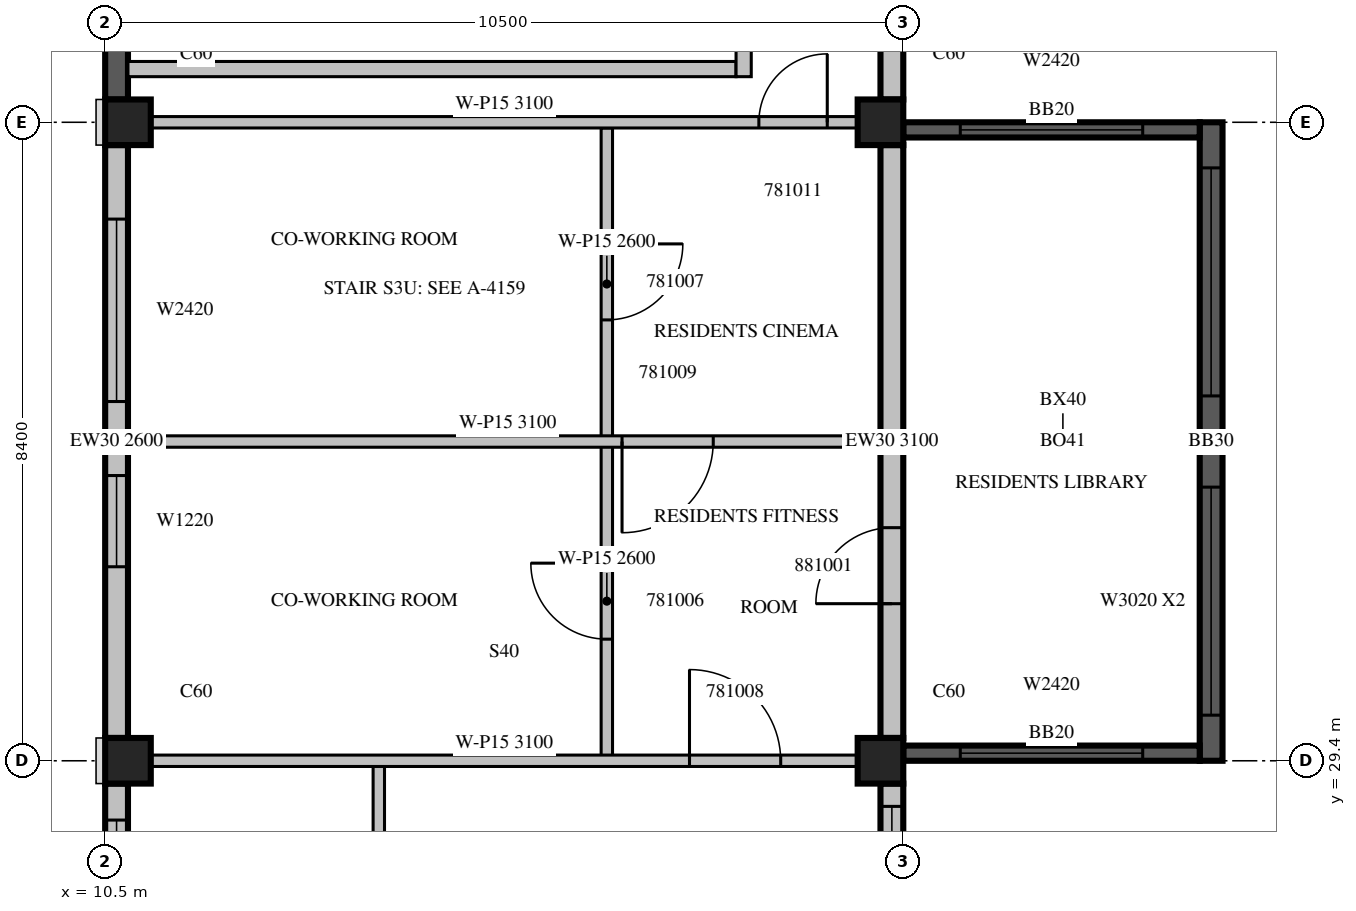
"""IFC4 building model, lengths in metres.
Left out: names, types, materials, properties, quantities, classifications, styles, units other than length and angle.
Written with IfcOpenShell. Run it as: python <this file> out.ifc"""

import sys

from ifc_helpers import new_model, si_unit, direction, frame, frame_2d, origin, origin_2d, place, context, subcontext, project, spatial, rectangle, extrude, source, transform, mapped, element, fill, save


model = new_model("IFC4")
c1 = context("Model", 3, precision=1e-05, world=origin(), true_north=direction((0.0, 1.0)))
c2 = subcontext(c1, "Body", "Model", "MODEL_VIEW")
j1 = project(units=[si_unit("LENGTHUNIT", "METRE"), si_unit("PLANEANGLEUNIT", "RADIAN")], contexts=[c1])
p1 = place(None, origin())
s1 = spatial("IfcSite", under=j1, at=p1, CompositionType="ELEMENT")
p2 = place(p1, origin())
s2 = spatial("IfcBuilding", under=s1, at=p2, CompositionType="ELEMENT")
p3 = place(p2, frame((0.0, 0.0, 344.0)))
s3 = spatial("IfcBuildingStorey", under=s2, at=p3, CompositionType="ELEMENT", Elevation=344.0)
m1 = source(origin(), c2, "Body", "SweptSolid", [
    extrude(rectangle(XDim=0.6, YDim=0.6, at=origin_2d()), origin(), (0.0, 0.0, 1.0), 3.5),
])
for number, where, z_axis, x_axis in (
    (1, (10.8, 29.4, 0.0), (0.0, 0.0, 1.0), (1.0, 0.0, 0.0)),
    (2, (20.7, 29.4, 0.0), (0.0, 0.0, 1.0), (1.0, 0.0, 0.0)),
    (3, (10.8, 37.8, 0.0), (0.0, 0.0, 1.0), (1.0, 0.0, 0.0)),
    (4, (20.7, 37.8, 0.0), (0.0, 0.0, 1.0), (1.0, 0.0, 0.0)),
):
    element("IfcColumn", number, at=place(p3, frame(where, z_axis=z_axis, x_axis=x_axis)), inside=s3, PredefinedType="COLUMN", context=c2, shape_type="MappedRepresentation", body=[
        mapped(m1, transform((0.0, 0.0, 0.0), scale=1.0)),
    ])
m2 = source(origin(), c2, "Body", "SweptSolid", [
    extrude(rectangle(XDim=8.4, YDim=0.3, at=frame_2d((4.2, 0.0))), origin(), (0.0, 0.0, 1.0), 3.1),
])
p4 = place(p3, frame((25.05, 29.4, 0.0), z_axis=(0.0, 0.0, 1.0), x_axis=(0.0, 1.0, 0.0)))
e5 = element("IfcWall", 5, at=p4, inside=s3, PredefinedType="SOLIDWALL", context=c2, shape_type="MappedRepresentation", body=[
    mapped(m2, transform((0.0, 0.0, 0.0), scale=1.0)),
])
m3 = source(origin(), c2, "Body", "SweptSolid", [
    extrude(rectangle(XDim=3.0, YDim=2.0, at=frame_2d((1.5, 1.0))), frame((0.0, 0.16, 0.0), z_axis=(0.0, -1.0, 0.0), x_axis=(1.0, 0.0, 0.0)), (0.0, 0.0, 1.0), 0.32),
])
p5 = place(p4, frame((0.6, 0.0, 0.6)))
e6 = element("IfcOpeningElement", 6, at=p5, cuts=e5, PredefinedType="OPENING", context=c2, shape_type="MappedRepresentation", body=[
    mapped(m3, transform((0.0, 0.0, 0.0), scale=1.0)),
])
p6 = place(p4, frame((4.8, 0.0, 0.6)))
e7 = element("IfcOpeningElement", 7, at=p6, cuts=e5, PredefinedType="OPENING", context=c2, shape_type="MappedRepresentation", body=[
    mapped(m3, transform((0.0, 0.0, 0.0), scale=1.0)),
])
m4 = source(origin(), c2, "Body", "SweptSolid", [
    extrude(rectangle(XDim=3.9, YDim=0.2, at=frame_2d((1.95, 0.0))), origin(), (0.0, 0.0, 1.0), 3.1),
])
p7 = place(p3, frame((21.0, 29.5, 0.0), z_axis=(0.0, 0.0, 1.0), x_axis=(1.0, 0.0, 0.0)))
e8 = element("IfcWall", 8, at=p7, inside=s3, PredefinedType="SOLIDWALL", context=c2, shape_type="MappedRepresentation", body=[
    mapped(m4, transform((0.0, 0.0, 0.0), scale=1.0)),
])
m5 = source(origin(), c2, "Body", "SweptSolid", [
    extrude(rectangle(XDim=2.4, YDim=2.0, at=frame_2d((1.2, 1.0))), frame((0.0, 0.11, 0.0), z_axis=(0.0, -1.0, 0.0), x_axis=(1.0, 0.0, 0.0)), (0.0, 0.0, 1.0), 0.22),
])
p8 = place(p7, frame((0.75, 0.0, 0.6)))
e9 = element("IfcOpeningElement", 9, at=p8, cuts=e8, PredefinedType="OPENING", context=c2, shape_type="MappedRepresentation", body=[
    mapped(m5, transform((0.0, 0.0, 0.0), scale=1.0)),
])
p9 = place(p3, frame((21.0, 37.7, 0.0), z_axis=(0.0, 0.0, 1.0), x_axis=(1.0, 0.0, 0.0)))
e10 = element("IfcWall", 10, at=p9, inside=s3, PredefinedType="SOLIDWALL", context=c2, shape_type="MappedRepresentation", body=[
    mapped(m4, transform((0.0, 0.0, 0.0), scale=1.0)),
])
p10 = place(p9, frame((0.75, 0.0, 0.6)))
e11 = element("IfcOpeningElement", 11, at=p10, cuts=e10, PredefinedType="OPENING", context=c2, shape_type="MappedRepresentation", body=[
    mapped(m5, transform((0.0, 0.0, 0.0), scale=1.0)),
])
m6 = source(origin(), c2, "Body", "SweptSolid", [
    extrude(rectangle(XDim=7.5, YDim=0.3, at=frame_2d((3.75, 0.0))), origin(), (0.0, 0.0, 1.0), 3.1),
])
p11 = place(p3, frame((20.85, 21.6, 0.0), z_axis=(0.0, 0.0, 1.0), x_axis=(0.0, 1.0, 0.0)))
e12 = element("IfcWall", 12, at=p11, inside=s3, PredefinedType="STANDARD", context=c2, shape_type="MappedRepresentation", body=[
    mapped(m6, transform((0.0, 0.0, 0.0), scale=1.0)),
])
m7 = source(origin(), c2, "Body", "SweptSolid", [
    extrude(rectangle(XDim=1.8, YDim=2.0, at=frame_2d((0.9, 1.0))), frame((0.0, 0.16, 0.0), z_axis=(0.0, -1.0, 0.0), x_axis=(1.0, 0.0, 0.0)), (0.0, 0.0, 1.0), 0.32),
])
p12 = place(p11, frame((0.463, 0.0, 0.6)))
e13 = element("IfcOpeningElement", 13, at=p12, cuts=e12, PredefinedType="OPENING", context=c2, shape_type="MappedRepresentation", body=[
    mapped(m7, transform((0.0, 0.0, 0.0), scale=1.0)),
])
p13 = place(p11, frame((4.2, 0.0, 0.6)))
e14 = element("IfcOpeningElement", 14, at=p13, cuts=e12, PredefinedType="OPENING", context=c2, shape_type="MappedRepresentation", body=[
    mapped(m3, transform((0.0, 0.0, 0.0), scale=1.0)),
])
m8 = source(origin(), c2, "Body", "SweptSolid", [
    extrude(rectangle(XDim=7.8, YDim=0.3, at=frame_2d((3.9, 0.0))), origin(), (0.0, 0.0, 1.0), 3.1),
])
p14 = place(p3, frame((20.85, 29.7, 0.0), z_axis=(0.0, 0.0, 1.0), x_axis=(0.0, 1.0, 0.0)))
e15 = element("IfcWall", 15, at=p14, inside=s3, PredefinedType="STANDARD", context=c2, shape_type="MappedRepresentation", body=[
    mapped(m8, transform((0.0, 0.0, 0.0), scale=1.0)),
])
m9 = source(origin(), c2, "Body", "SweptSolid", [
    extrude(rectangle(XDim=1.0, YDim=2.1, at=frame_2d((0.5, 1.05))), frame((0.0, 0.16, 0.0), z_axis=(0.0, -1.0, 0.0), x_axis=(1.0, 0.0, 0.0)), (0.0, 0.0, 1.0), 0.32),
])
p15 = place(p14, frame((1.767, 0.0, 0.0)))
e16 = element("IfcOpeningElement", 16, at=p15, cuts=e15, PredefinedType="OPENING", context=c2, shape_type="MappedRepresentation", body=[
    mapped(m9, transform((0.0, 0.0, 0.0), scale=1.0)),
])
m10 = source(origin(), c2, "Body", "SweptSolid", [
    extrude(rectangle(XDim=5.58, YDim=0.3, at=frame_2d((2.79, 0.0))), origin(), (0.0, 0.0, 1.0), 3.1),
])
p16 = place(p3, frame((20.85, 38.1, 0.0), z_axis=(0.0, 0.0, 1.0), x_axis=(0.0, 1.0, 0.0)))
e17 = element("IfcWall", 17, at=p16, inside=s3, PredefinedType="STANDARD", context=c2, shape_type="MappedRepresentation", body=[
    mapped(m10, transform((0.0, 0.0, 0.0), scale=1.0)),
])
m11 = source(origin(), c2, "Body", "SweptSolid", [
    extrude(rectangle(XDim=3.6, YDim=2.0, at=frame_2d((1.8, 1.0))), frame((0.0, 0.16, 0.0), z_axis=(0.0, -1.0, 0.0), x_axis=(1.0, 0.0, 0.0)), (0.0, 0.0, 1.0), 0.32),
])
p17 = place(p16, frame((0.84, 0.0, 0.6)))
e18 = element("IfcOpeningElement", 18, at=p17, cuts=e17, PredefinedType="OPENING", context=c2, shape_type="MappedRepresentation", body=[
    mapped(m11, transform((0.0, 0.0, 0.0), scale=1.0)),
])
m12 = source(origin(), c2, "Body", "SweptSolid", [
    extrude(rectangle(XDim=5.58, YDim=0.3, at=frame_2d((2.79, 0.0))), origin(), (0.0, 0.0, 1.0), 3.1),
])
p18 = place(p3, frame((10.65, 43.68, 0.0), z_axis=(0.0, 0.0, 1.0), x_axis=(0.0, -1.0, 0.0)))
e19 = element("IfcWall", 19, at=p18, inside=s3, PredefinedType="SOLIDWALL", context=c2, shape_type="MappedRepresentation", body=[
    mapped(m12, transform((0.0, 0.0, 0.0), scale=1.0)),
])
m13 = source(origin(), c2, "Body", "SweptSolid", [
    extrude(rectangle(XDim=7.8, YDim=0.3, at=frame_2d((3.9, 0.0))), origin(), (0.0, 0.0, 1.0), 2.6),
])
p19 = place(p3, frame((10.65, 37.5, 0.0), z_axis=(0.0, 0.0, 1.0), x_axis=(0.0, -1.0, 0.0)))
e20 = element("IfcWall", 20, at=p19, inside=s3, PredefinedType="STANDARD", context=c2, shape_type="MappedRepresentation", body=[
    mapped(m13, transform((0.0, 0.0, 0.0), scale=1.0)),
])
m14 = source(origin(), c2, "Body", "SweptSolid", [
    extrude(rectangle(XDim=1.2, YDim=2.0, at=frame_2d((0.6, 1.0))), frame((0.0, 0.16, 0.0), z_axis=(0.0, -1.0, 0.0), x_axis=(1.0, 0.0, 0.0)), (0.0, 0.0, 1.0), 0.32),
])
p20 = place(p19, frame((4.348, 0.0, 0.6)))
e21 = element("IfcOpeningElement", 21, at=p20, cuts=e20, PredefinedType="OPENING", context=c2, shape_type="MappedRepresentation", body=[
    mapped(m14, transform((0.0, 0.0, 0.0), scale=1.0)),
])
m15 = source(origin(), c2, "Body", "SweptSolid", [
    extrude(rectangle(XDim=2.4, YDim=2.0, at=frame_2d((1.2, 1.0))), frame((0.0, 0.16, 0.0), z_axis=(0.0, -1.0, 0.0), x_axis=(1.0, 0.0, 0.0)), (0.0, 0.0, 1.0), 0.32),
])
p21 = place(p19, frame((0.974, 0.0, 0.6)))
e22 = element("IfcOpeningElement", 22, at=p21, cuts=e20, PredefinedType="OPENING", context=c2, shape_type="MappedRepresentation", body=[
    mapped(m15, transform((0.0, 0.0, 0.0), scale=1.0)),
])
p22 = place(p3, frame((10.65, 29.1, 0.0), z_axis=(0.0, 0.0, 1.0), x_axis=(0.0, -1.0, 0.0)))
e23 = element("IfcWall", 23, at=p22, inside=s3, PredefinedType="STANDARD", context=c2, shape_type="MappedRepresentation", body=[
    mapped(m6, transform((0.0, 0.0, 0.0), scale=1.0)),
])
p23 = place(p22, frame((3.36, 0.0, 0.6)))
e24 = element("IfcOpeningElement", 24, at=p23, cuts=e23, PredefinedType="OPENING", context=c2, shape_type="MappedRepresentation", body=[
    mapped(m11, transform((0.0, 0.0, 0.0), scale=1.0)),
])
p24 = place(p22, frame((0.48, 0.0, 0.6)))
e25 = element("IfcOpeningElement", 25, at=p24, cuts=e23, PredefinedType="OPENING", context=c2, shape_type="MappedRepresentation", body=[
    mapped(m15, transform((0.0, 0.0, 0.0), scale=1.0)),
])
m16 = source(origin(), c2, "Body", "SweptSolid", [
    extrude(rectangle(XDim=8.0, YDim=0.2, at=frame_2d((4.0, 0.0))), origin(), (0.0, 0.0, 1.0), 3.1),
])
p25 = place(p3, frame((10.8, 38.5, 0.0), z_axis=(0.0, 0.0, 1.0), x_axis=(1.0, 0.0, 0.0)))
e26 = element("IfcWall", 26, at=p25, inside=s3, PredefinedType="PARTITIONING", context=c2, shape_type="MappedRepresentation", body=[
    mapped(m16, transform((0.0, 0.0, 0.0), scale=1.0)),
])
m17 = source(origin(), c2, "Body", "SweptSolid", [
    extrude(rectangle(XDim=5.45, YDim=0.2, at=frame_2d((2.725, 0.0))), origin(), (0.0, 0.0, 1.0), 3.1),
])
p26 = place(p3, frame((18.9, 38.4, 0.0), z_axis=(0.0, 0.0, 1.0), x_axis=(0.0, 1.0, 0.0)))
e27 = element("IfcWall", 27, at=p26, inside=s3, PredefinedType="PARTITIONING", context=c2, shape_type="MappedRepresentation", body=[
    mapped(m17, transform((0.0, 0.0, 0.0), scale=1.0)),
])
m18 = source(origin(), c2, "Body", "SweptSolid", [
    extrude(rectangle(XDim=1.2, YDim=2.1, at=frame_2d((0.6, 1.05))), frame((0.0, 0.11, 0.0), z_axis=(0.0, -1.0, 0.0), x_axis=(1.0, 0.0, 0.0)), (0.0, 0.0, 1.0), 0.22),
])
p27 = place(p26, frame((0.4, 0.0, 0.0)))
e28 = element("IfcOpeningElement", 28, at=p27, cuts=e27, PredefinedType="OPENING", context=c2, shape_type="MappedRepresentation", body=[
    mapped(m18, transform((0.0, 0.0, 0.0), scale=1.0)),
])
m19 = source(origin(), c2, "Body", "SweptSolid", [
    extrude(rectangle(XDim=0.9, YDim=2.1, at=frame_2d((0.45, 1.05))), frame((0.0, 0.11, 0.0), z_axis=(0.0, -1.0, 0.0), x_axis=(1.0, 0.0, 0.0)), (0.0, 0.0, 1.0), 0.22),
])
p28 = place(p26, frame((3.25, 0.0, 0.0)))
e29 = element("IfcOpeningElement", 29, at=p28, cuts=e27, PredefinedType="OPENING", context=c2, shape_type="MappedRepresentation", body=[
    mapped(m19, transform((0.0, 0.0, 0.0), scale=1.0)),
])
m20 = source(origin(), c2, "Body", "SweptSolid", [
    extrude(rectangle(XDim=7.725, YDim=0.15, at=frame_2d((3.862, 0.0))), origin(), (0.0, 0.0, 1.0), 3.1),
])
p29 = place(p3, frame((14.1, 29.325, 0.0), z_axis=(0.0, 0.0, 1.0), x_axis=(0.0, -1.0, 0.0)))
e30 = element("IfcWall", 30, at=p29, inside=s3, PredefinedType="PARTITIONING", context=c2, shape_type="MappedRepresentation", body=[
    mapped(m20, transform((0.0, 0.0, 0.0), scale=1.0)),
])
m21 = source(origin(), c2, "Body", "SweptSolid", [
    extrude(rectangle(XDim=2.2, YDim=2.1, at=frame_2d((1.1, 1.05))), frame((0.0, 0.085, 0.0), z_axis=(0.0, -1.0, 0.0), x_axis=(1.0, 0.0, 0.0)), (0.0, 0.0, 1.0), 0.17),
])
p30 = place(p29, frame((5.325, 0.0, 0.0)))
e31 = element("IfcOpeningElement", 31, at=p30, cuts=e30, PredefinedType="OPENING", context=c2, shape_type="MappedRepresentation", body=[
    mapped(m21, transform((0.0, 0.0, 0.0), scale=1.0)),
])
m22 = source(origin(), c2, "Body", "SweptSolid", [
    extrude(rectangle(XDim=4.2, YDim=0.15, at=frame_2d((2.1, 0.0))), origin(), (0.0, 0.0, 1.0), 2.6),
])
p31 = place(p3, frame((17.1, 33.6, 0.0), z_axis=(0.0, 0.0, 1.0), x_axis=(0.0, -1.0, 0.0)))
e32 = element("IfcWall", 32, at=p31, inside=s3, PredefinedType="PARTITIONING", context=c2, shape_type="MappedRepresentation", body=[
    mapped(m22, transform((0.0, 0.0, 0.0), scale=1.0)),
])
m23 = source(origin(), c2, "Body", "SweptSolid", [
    extrude(rectangle(XDim=1.0, YDim=2.1, at=frame_2d((0.5, 1.05))), frame((0.0, 0.085, 0.0), z_axis=(0.0, -1.0, 0.0), x_axis=(1.0, 0.0, 0.0)), (0.0, 0.0, 1.0), 0.17),
])
p32 = place(p31, frame((1.6, 0.0, 0.0)))
e33 = element("IfcOpeningElement", 33, at=p32, cuts=e32, PredefinedType="OPENING", context=c2, shape_type="MappedRepresentation", body=[
    mapped(m23, transform((0.0, 0.0, 0.0), scale=1.0)),
])
m24 = source(origin(), c2, "Body", "SweptSolid", [
    extrude(rectangle(XDim=4.105, YDim=0.15, at=frame_2d((2.053, 0.0))), origin(), (0.0, 0.0, 1.0), 2.6),
])
p33 = place(p3, frame((17.1, 37.725, 0.0), z_axis=(0.0, 0.0, 1.0), x_axis=(0.0, -1.0, 0.0)))
e34 = element("IfcWall", 34, at=p33, inside=s3, PredefinedType="PARTITIONING", context=c2, shape_type="MappedRepresentation", body=[
    mapped(m24, transform((0.0, 0.0, 0.0), scale=1.0)),
])
p34 = place(p33, frame((1.525, 0.0, 0.0)))
e35 = element("IfcOpeningElement", 35, at=p34, cuts=e34, PredefinedType="OPENING", context=c2, shape_type="MappedRepresentation", body=[
    mapped(m23, transform((0.0, 0.0, 0.0), scale=1.0)),
])
m25 = source(origin(), c2, "Body", "SweptSolid", [
    extrude(rectangle(XDim=9.302, YDim=0.15, at=frame_2d((4.651, 0.0))), origin(), (0.0, 0.0, 1.0), 3.1),
])
p35 = place(p3, frame((11.099, 29.4, 0.0), z_axis=(0.0, 0.0, 1.0), x_axis=(1.0, 0.0, 0.0)))
e36 = element("IfcWall", 36, at=p35, inside=s3, PredefinedType="PARTITIONING", context=c2, shape_type="MappedRepresentation", body=[
    mapped(m25, transform((0.0, 0.0, 0.0), scale=1.0)),
])
m26 = source(origin(), c2, "Body", "SweptSolid", [
    extrude(rectangle(XDim=1.2, YDim=2.1, at=frame_2d((0.6, 1.05))), frame((0.0, 0.085, 0.0), z_axis=(0.0, -1.0, 0.0), x_axis=(1.0, 0.0, 0.0)), (0.0, 0.0, 1.0), 0.17),
])
p36 = place(p35, frame((7.088, 0.0, 0.0)))
e37 = element("IfcOpeningElement", 37, at=p36, cuts=e36, PredefinedType="OPENING", context=c2, shape_type="MappedRepresentation", body=[
    mapped(m26, transform((0.0, 0.0, 0.0), scale=1.0)),
])
m27 = source(origin(), c2, "Body", "SweptSolid", [
    extrude(rectangle(XDim=9.995, YDim=0.15, at=frame_2d((4.997, 0.0))), origin(), (0.0, 0.0, 1.0), 3.1),
])
p37 = place(p3, frame((10.8, 33.6, 0.0), z_axis=(0.0, 0.0, 1.0), x_axis=(1.0, 0.0, 0.0)))
e38 = element("IfcWall", 38, at=p37, inside=s3, PredefinedType="PARTITIONING", context=c2, shape_type="MappedRepresentation", body=[
    mapped(m27, transform((0.0, 0.0, 0.0), scale=1.0)),
])
p38 = place(p37, frame((6.5, 0.0, 0.0)))
e39 = element("IfcOpeningElement", 39, at=p38, cuts=e38, PredefinedType="OPENING", context=c2, shape_type="MappedRepresentation", body=[
    mapped(m26, transform((0.0, 0.0, 0.0), scale=1.0)),
])
p39 = place(p3, frame((20.401, 37.8, 0.0), z_axis=(0.0, 0.0, 1.0), x_axis=(-1.0, 0.0, 0.0)))
e40 = element("IfcWall", 40, at=p39, inside=s3, PredefinedType="PARTITIONING", context=c2, shape_type="MappedRepresentation", body=[
    mapped(m25, transform((0.0, 0.0, 0.0), scale=1.0)),
])
m28 = source(origin(), c2, "Body", "SweptSolid", [
    extrude(rectangle(XDim=0.9, YDim=2.1, at=frame_2d((0.45, 1.05))), frame((0.0, 0.085, 0.0), z_axis=(0.0, -1.0, 0.0), x_axis=(1.0, 0.0, 0.0)), (0.0, 0.0, 1.0), 0.17),
])
p40 = place(p39, frame((0.401, 0.0, 0.0)))
e41 = element("IfcOpeningElement", 41, at=p40, cuts=e40, PredefinedType="OPENING", context=c2, shape_type="MappedRepresentation", body=[
    mapped(m28, transform((0.0, 0.0, 0.0), scale=1.0)),
])
m29 = source(origin(), c2, "Body", "SweptSolid", [
    extrude(rectangle(XDim=3.0, YDim=2.0, at=frame_2d((1.5, 1.0))), frame((0.0, 0.03, 0.0), z_axis=(0.0, -1.0, 0.0), x_axis=(1.0, 0.0, 0.0)), (0.0, 0.0, 1.0), 0.06),
])
p41 = place(p5, origin())
e42 = element("IfcWindow", 42, at=p41, inside=s3, PartitioningType="SINGLE_PANEL", PredefinedType="WINDOW", context=c2, shape_type="MappedRepresentation", body=[
    mapped(m29, transform((0.0, 0.0, 0.0), scale=1.0)),
])
fill(e6, e42)
p42 = place(p6, origin())
e43 = element("IfcWindow", 43, at=p42, inside=s3, PartitioningType="SINGLE_PANEL", PredefinedType="WINDOW", context=c2, shape_type="MappedRepresentation", body=[
    mapped(m29, transform((0.0, 0.0, 0.0), scale=1.0)),
])
fill(e7, e43)
m30 = source(origin(), c2, "Body", "SweptSolid", [
    extrude(rectangle(XDim=2.4, YDim=2.0, at=frame_2d((1.2, 1.0))), frame((0.0, 0.03, 0.0), z_axis=(0.0, -1.0, 0.0), x_axis=(1.0, 0.0, 0.0)), (0.0, 0.0, 1.0), 0.06),
])
p43 = place(p8, origin())
e44 = element("IfcWindow", 44, at=p43, inside=s3, PartitioningType="SINGLE_PANEL", PredefinedType="WINDOW", context=c2, shape_type="MappedRepresentation", body=[
    mapped(m30, transform((0.0, 0.0, 0.0), scale=1.0)),
])
fill(e9, e44)
p44 = place(p10, origin())
e45 = element("IfcWindow", 45, at=p44, inside=s3, PartitioningType="SINGLE_PANEL", PredefinedType="WINDOW", context=c2, shape_type="MappedRepresentation", body=[
    mapped(m30, transform((0.0, 0.0, 0.0), scale=1.0)),
])
fill(e11, e45)
p45 = place(p13, origin())
e46 = element("IfcWindow", 46, at=p45, inside=s3, PartitioningType="SINGLE_PANEL", PredefinedType="WINDOW", context=c2, shape_type="MappedRepresentation", body=[
    mapped(m29, transform((0.0, 0.0, 0.0), scale=1.0)),
])
fill(e14, e46)
m31 = source(origin(), c2, "Body", "SweptSolid", [
    extrude(rectangle(XDim=1.2, YDim=2.0, at=frame_2d((0.6, 1.0))), frame((0.0, 0.03, 0.0), z_axis=(0.0, -1.0, 0.0), x_axis=(1.0, 0.0, 0.0)), (0.0, 0.0, 1.0), 0.06),
])
p46 = place(p20, origin())
e47 = element("IfcWindow", 47, at=p46, inside=s3, PartitioningType="SINGLE_PANEL", PredefinedType="WINDOW", context=c2, shape_type="MappedRepresentation", body=[
    mapped(m31, transform((0.0, 0.0, 0.0), scale=1.0)),
])
fill(e21, e47)
p47 = place(p21, origin())
e48 = element("IfcWindow", 48, at=p47, inside=s3, PartitioningType="SINGLE_PANEL", PredefinedType="WINDOW", context=c2, shape_type="MappedRepresentation", body=[
    mapped(m30, transform((0.0, 0.0, 0.0), scale=1.0)),
])
fill(e22, e48)
p48 = place(p24, origin())
e49 = element("IfcWindow", 49, at=p48, inside=s3, PartitioningType="SINGLE_PANEL", PredefinedType="WINDOW", context=c2, shape_type="MappedRepresentation", body=[
    mapped(m30, transform((0.0, 0.0, 0.0), scale=1.0)),
])
fill(e25, e49)
m32 = source(origin(), c2, "Body", "SweptSolid", [
    extrude(rectangle(XDim=1.0, YDim=2.1, at=frame_2d((0.5, 1.05))), frame((0.0, 0.025, 0.0), z_axis=(0.0, -1.0, 0.0), x_axis=(1.0, 0.0, 0.0)), (0.0, 0.0, 1.0), 0.05),
])
p49 = place(p32, origin())
e50 = element("IfcDoor", 50, at=p49, inside=s3, OperationType="SINGLE_SWING_RIGHT", PredefinedType="DOOR", context=c2, shape_type="MappedRepresentation", body=[
    mapped(m32, transform((0.0, 0.0, 0.0), scale=1.0)),
])
fill(e33, e50)
p50 = place(p34, origin())
e51 = element("IfcDoor", 51, at=p50, inside=s3, OperationType="SINGLE_SWING_LEFT", PredefinedType="DOOR", context=c2, shape_type="MappedRepresentation", body=[
    mapped(m32, transform((0.0, 0.0, 0.0), scale=1.0)),
])
fill(e35, e51)
m33 = source(origin(), c2, "Body", "SweptSolid", [
    extrude(rectangle(XDim=1.2, YDim=2.1, at=frame_2d((0.6, 1.05))), frame((0.0, 0.025, 0.0), z_axis=(0.0, -1.0, 0.0), x_axis=(1.0, 0.0, 0.0)), (0.0, 0.0, 1.0), 0.05),
])
p51 = place(p36, origin())
e52 = element("IfcDoor", 52, at=p51, inside=s3, OperationType="SINGLE_SWING_LEFT", PredefinedType="DOOR", context=c2, shape_type="MappedRepresentation", body=[
    mapped(m33, transform((0.0, 0.0, 0.0), scale=1.0)),
])
fill(e37, e52)
p52 = place(p38, origin())
e53 = element("IfcDoor", 53, at=p52, inside=s3, OperationType="SINGLE_SWING_RIGHT", PredefinedType="DOOR", context=c2, shape_type="MappedRepresentation", body=[
    mapped(m33, transform((0.0, 0.0, 0.0), scale=1.0)),
])
fill(e39, e53)
m34 = source(origin(), c2, "Body", "SweptSolid", [
    extrude(rectangle(XDim=0.9, YDim=2.1, at=frame_2d((0.45, 1.05))), frame((0.0, 0.025, 0.0), z_axis=(0.0, -1.0, 0.0), x_axis=(1.0, 0.0, 0.0)), (0.0, 0.0, 1.0), 0.05),
])
p53 = place(p40, origin())
e54 = element("IfcDoor", 54, at=p53, inside=s3, OperationType="SINGLE_SWING_RIGHT", PredefinedType="DOOR", context=c2, shape_type="MappedRepresentation", body=[
    mapped(m34, transform((0.0, 0.0, 0.0), scale=1.0)),
])
fill(e41, e54)
p54 = place(p15, origin())
e55 = element("IfcDoor", 55, at=p54, inside=s3, OperationType="SINGLE_SWING_LEFT", PredefinedType="DOOR", context=c2, shape_type="MappedRepresentation", body=[
    mapped(m32, transform((0.0, 0.0, 0.0), scale=1.0)),
])
fill(e16, e55)
save(model, sys.argv[1])
